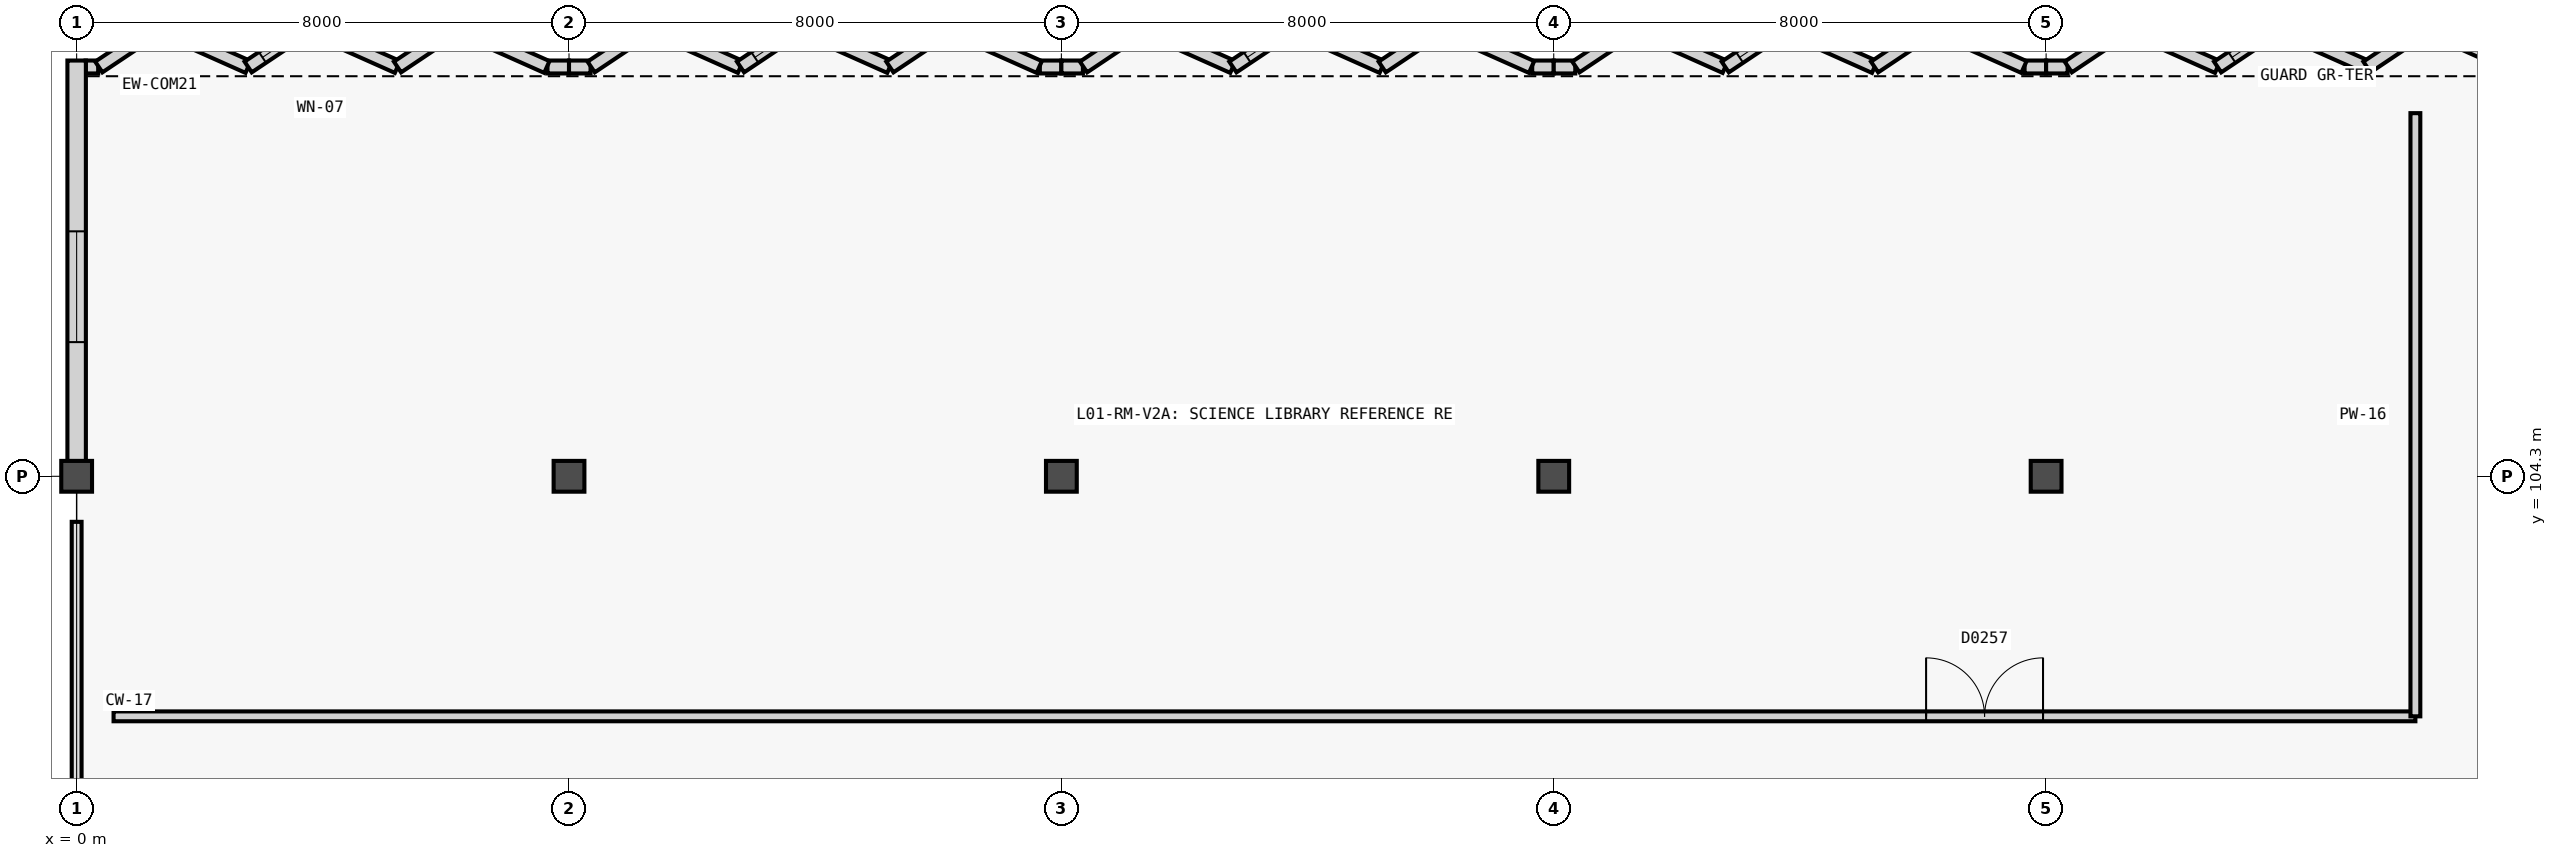
"""IFC4 building model, lengths in metres.
Left out: names, types, materials, properties, quantities, classifications, styles, units other than length and angle.
Written with IfcOpenShell. Run it as: python <this file> out.ifc"""

import sys

from ifc_helpers import new_model, si_unit, direction, frame, frame_2d, origin, origin_2d, place, context, subcontext, project, spatial, rectangle, extrude, element, fill, save


model = new_model("IFC4")
c1 = context("Model", 3, precision=1e-05, world=origin(), true_north=direction((0.0, 1.0)))
c2 = subcontext(c1, "Body", "Model", "MODEL_VIEW")
j1 = project(units=[si_unit("LENGTHUNIT", "METRE"), si_unit("PLANEANGLEUNIT", "RADIAN")], contexts=[c1])
p1 = place(None, origin())
s1 = spatial("IfcSite", under=j1, at=p1, CompositionType="ELEMENT")
p2 = place(p1, origin())
s2 = spatial("IfcBuilding", under=s1, at=p2, CompositionType="ELEMENT")
p3 = place(p2, frame((0.0, 0.0, 5.4)))
s3 = spatial("IfcBuildingStorey", under=s2, at=p3, CompositionType="ELEMENT", Elevation=5.4)
for number, where, z_axis, x_axis in (
    (1, (0.0, 104.3, 0.0), (0.0, 0.0, 1.0), (1.0, 0.0, 0.0)),
    (2, (8.0, 104.3, 0.0), (0.0, 0.0, 1.0), (1.0, 0.0, 0.0)),
    (3, (16.0, 104.3, 0.0), (0.0, 0.0, 1.0), (1.0, 0.0, 0.0)),
    (4, (24.0, 104.3, 0.0), (0.0, 0.0, 1.0), (1.0, 0.0, 0.0)),
    (5, (32.0, 104.3, 0.0), (0.0, 0.0, 1.0), (1.0, 0.0, 0.0)),
):
    element("IfcColumn", number, at=place(p3, frame(where, z_axis=z_axis, x_axis=x_axis)), inside=s3, PredefinedType="COLUMN", context=c2, shape_type="SweptSolid", body=[
        extrude(rectangle(XDim=0.5, YDim=0.5, at=origin_2d()), origin(), (0.0, 0.0, 1.0), 4.8),
    ])
p4 = place(p3, frame((0.145, 110.95, 0.0), z_axis=(0.0, 0.0, 1.0), x_axis=(1.0, 0.0, 0.0)))
e6 = element("IfcWall", 6, at=p4, inside=s3, PredefinedType="SOLIDWALL", context=c2, shape_type="SweptSolid", body=[
    extrude(rectangle(XDim=0.205, YDim=0.21, at=frame_2d((0.103, 0.0))), origin(), (0.0, 0.0, 1.0), 4.52),
])
for number, where, z_axis, x_axis in (
    (7, (7.65, 110.95, 0.0), (0.0, 0.0, 1.0), (1.0, 0.0, 0.0)),
    (8, (8.0, 110.95, 0.0), (0.0, 0.0, 1.0), (1.0, 0.0, 0.0)),
    (9, (15.65, 110.95, 0.0), (0.0, 0.0, 1.0), (1.0, 0.0, 0.0)),
    (10, (16.0, 110.95, 0.0), (0.0, 0.0, 1.0), (1.0, 0.0, 0.0)),
    (11, (23.65, 110.95, 0.0), (0.0, 0.0, 1.0), (1.0, 0.0, 0.0)),
    (12, (24.0, 110.95, 0.0), (0.0, 0.0, 1.0), (1.0, 0.0, 0.0)),
    (13, (31.65, 110.95, 0.0), (0.0, 0.0, 1.0), (1.0, 0.0, 0.0)),
    (14, (32.0, 110.95, 0.0), (0.0, 0.0, 1.0), (1.0, 0.0, 0.0)),
):
    element("IfcWall", number, at=place(p3, frame(where, z_axis=z_axis, x_axis=x_axis)), inside=s3, PredefinedType="SOLIDWALL", context=c2, shape_type="SweptSolid", body=[
        extrude(rectangle(XDim=0.35, YDim=0.21, at=frame_2d((0.175, 0.0))), origin(), (0.0, 0.0, 1.0), 4.52),
    ])
p5 = place(p3, frame((0.36, 110.95, 0.0), z_axis=(0.0, 0.0, 1.0), x_axis=(0.830858868059, 0.556483190553, 0.0)))
e15 = element("IfcWall", 15, at=p5, inside=s3, PredefinedType="SOLIDWALL", context=c2, shape_type="SweptSolid", body=[
    extrude(rectangle(XDim=1.168, YDim=0.21, at=frame_2d((0.584, 0.0))), origin(), (0.0, 0.0, 1.0), 4.52),
])
p6 = place(p3, frame((1.331, 111.6, 0.0), z_axis=(0.0, 0.0, 1.0), x_axis=(0.913083928543, -0.407771675618, 0.0)))
e16 = element("IfcWall", 16, at=p6, inside=s3, PredefinedType="SOLIDWALL", context=c2, shape_type="SweptSolid", body=[
    extrude(rectangle(XDim=1.594, YDim=0.21, at=frame_2d((0.797, 0.0))), origin(), (0.0, 0.0, 1.0), 4.52),
])
p7 = place(p3, frame((2.787, 110.95, 0.0), z_axis=(0.0, 0.0, 1.0), x_axis=(0.830858868059, 0.556483190553, 0.0)))
e17 = element("IfcWall", 17, at=p7, inside=s3, PredefinedType="SOLIDWALL", context=c2, shape_type="SweptSolid", body=[
    extrude(rectangle(XDim=1.168, YDim=0.21, at=frame_2d((0.584, 0.0))), origin(), (0.0, 0.0, 1.0), 4.52),
])
p8 = place(p7, frame((0.28, 0.0, 0.85)))
e18 = element("IfcOpeningElement", 18, at=p8, cuts=e17, PredefinedType="OPENING", context=c2, shape_type="SweptSolid", body=[
    extrude(rectangle(XDim=0.65, YDim=1.7, at=frame_2d((0.325, 0.85))), frame((0.0, 0.115, 0.0), z_axis=(0.0, -1.0, 0.0), x_axis=(1.0, 0.0, 0.0)), (0.0, 0.0, 1.0), 0.23),
])
p9 = place(p3, frame((3.757, 111.6, 0.0), z_axis=(0.0, 0.0, 1.0), x_axis=(0.913109384471, -0.407714669826, 0.0)))
e19 = element("IfcWall", 19, at=p9, inside=s3, PredefinedType="SOLIDWALL", context=c2, shape_type="SweptSolid", body=[
    extrude(rectangle(XDim=1.595, YDim=0.21, at=frame_2d((0.797, 0.0))), origin(), (0.0, 0.0, 1.0), 4.52),
])
p10 = place(p3, frame((5.213, 110.95, 0.0), z_axis=(0.0, 0.0, 1.0), x_axis=(0.830858868059, 0.556483190553, 0.0)))
e20 = element("IfcWall", 20, at=p10, inside=s3, PredefinedType="SOLIDWALL", context=c2, shape_type="SweptSolid", body=[
    extrude(rectangle(XDim=1.168, YDim=0.21, at=frame_2d((0.584, 0.0))), origin(), (0.0, 0.0, 1.0), 4.52),
])
p11 = place(p3, frame((6.184, 111.6, 0.0), z_axis=(0.0, 0.0, 1.0), x_axis=(0.913083928543, -0.407771675618, 0.0)))
e21 = element("IfcWall", 21, at=p11, inside=s3, PredefinedType="SOLIDWALL", context=c2, shape_type="SweptSolid", body=[
    extrude(rectangle(XDim=1.594, YDim=0.21, at=frame_2d((0.797, 0.0))), origin(), (0.0, 0.0, 1.0), 4.52),
])
p12 = place(p3, frame((8.36, 110.95, 0.0), z_axis=(0.0, 0.0, 1.0), x_axis=(0.830858868059, 0.556483190553, 0.0)))
e22 = element("IfcWall", 22, at=p12, inside=s3, PredefinedType="SOLIDWALL", context=c2, shape_type="SweptSolid", body=[
    extrude(rectangle(XDim=1.168, YDim=0.21, at=frame_2d((0.584, 0.0))), origin(), (0.0, 0.0, 1.0), 4.52),
])
p13 = place(p3, frame((9.331, 111.6, 0.0), z_axis=(0.0, 0.0, 1.0), x_axis=(0.913083928543, -0.407771675618, 0.0)))
e23 = element("IfcWall", 23, at=p13, inside=s3, PredefinedType="SOLIDWALL", context=c2, shape_type="SweptSolid", body=[
    extrude(rectangle(XDim=1.594, YDim=0.21, at=frame_2d((0.797, 0.0))), origin(), (0.0, 0.0, 1.0), 4.52),
])
p14 = place(p3, frame((10.787, 110.95, 0.0), z_axis=(0.0, 0.0, 1.0), x_axis=(0.830858868059, 0.556483190553, 0.0)))
e24 = element("IfcWall", 24, at=p14, inside=s3, PredefinedType="SOLIDWALL", context=c2, shape_type="SweptSolid", body=[
    extrude(rectangle(XDim=1.168, YDim=0.21, at=frame_2d((0.584, 0.0))), origin(), (0.0, 0.0, 1.0), 4.52),
])
p15 = place(p14, frame((0.28, 0.0, 0.85)))
e25 = element("IfcOpeningElement", 25, at=p15, cuts=e24, PredefinedType="OPENING", context=c2, shape_type="SweptSolid", body=[
    extrude(rectangle(XDim=0.65, YDim=1.7, at=frame_2d((0.325, 0.85))), frame((0.0, 0.115, 0.0), z_axis=(0.0, -1.0, 0.0), x_axis=(1.0, 0.0, 0.0)), (0.0, 0.0, 1.0), 0.23),
])
p16 = place(p3, frame((11.757, 111.6, 0.0), z_axis=(0.0, 0.0, 1.0), x_axis=(0.913109384471, -0.407714669826, 0.0)))
e26 = element("IfcWall", 26, at=p16, inside=s3, PredefinedType="SOLIDWALL", context=c2, shape_type="SweptSolid", body=[
    extrude(rectangle(XDim=1.595, YDim=0.21, at=frame_2d((0.797, 0.0))), origin(), (0.0, 0.0, 1.0), 4.52),
])
p17 = place(p3, frame((13.213, 110.95, 0.0), z_axis=(0.0, 0.0, 1.0), x_axis=(0.830858868059, 0.556483190553, 0.0)))
e27 = element("IfcWall", 27, at=p17, inside=s3, PredefinedType="SOLIDWALL", context=c2, shape_type="SweptSolid", body=[
    extrude(rectangle(XDim=1.168, YDim=0.21, at=frame_2d((0.584, 0.0))), origin(), (0.0, 0.0, 1.0), 4.52),
])
p18 = place(p3, frame((14.184, 111.6, 0.0), z_axis=(0.0, 0.0, 1.0), x_axis=(0.913083928543, -0.407771675618, 0.0)))
e28 = element("IfcWall", 28, at=p18, inside=s3, PredefinedType="SOLIDWALL", context=c2, shape_type="SweptSolid", body=[
    extrude(rectangle(XDim=1.594, YDim=0.21, at=frame_2d((0.797, 0.0))), origin(), (0.0, 0.0, 1.0), 4.52),
])
p19 = place(p3, frame((16.36, 110.95, 0.0), z_axis=(0.0, 0.0, 1.0), x_axis=(0.830858868059, 0.556483190553, 0.0)))
e29 = element("IfcWall", 29, at=p19, inside=s3, PredefinedType="SOLIDWALL", context=c2, shape_type="SweptSolid", body=[
    extrude(rectangle(XDim=1.168, YDim=0.21, at=frame_2d((0.584, 0.0))), origin(), (0.0, 0.0, 1.0), 4.52),
])
p20 = place(p3, frame((17.331, 111.6, 0.0), z_axis=(0.0, 0.0, 1.0), x_axis=(0.913083928543, -0.407771675618, 0.0)))
e30 = element("IfcWall", 30, at=p20, inside=s3, PredefinedType="SOLIDWALL", context=c2, shape_type="SweptSolid", body=[
    extrude(rectangle(XDim=1.594, YDim=0.21, at=frame_2d((0.797, 0.0))), origin(), (0.0, 0.0, 1.0), 4.52),
])
p21 = place(p3, frame((18.787, 110.95, 0.0), z_axis=(0.0, 0.0, 1.0), x_axis=(0.830858868059, 0.556483190553, 0.0)))
e31 = element("IfcWall", 31, at=p21, inside=s3, PredefinedType="SOLIDWALL", context=c2, shape_type="SweptSolid", body=[
    extrude(rectangle(XDim=1.168, YDim=0.21, at=frame_2d((0.584, 0.0))), origin(), (0.0, 0.0, 1.0), 4.52),
])
p22 = place(p21, frame((0.28, 0.0, 0.85)))
e32 = element("IfcOpeningElement", 32, at=p22, cuts=e31, PredefinedType="OPENING", context=c2, shape_type="SweptSolid", body=[
    extrude(rectangle(XDim=0.65, YDim=1.7, at=frame_2d((0.325, 0.85))), frame((0.0, 0.115, 0.0), z_axis=(0.0, -1.0, 0.0), x_axis=(1.0, 0.0, 0.0)), (0.0, 0.0, 1.0), 0.23),
])
p23 = place(p3, frame((19.757, 111.6, 0.0), z_axis=(0.0, 0.0, 1.0), x_axis=(0.913109384471, -0.407714669826, 0.0)))
e33 = element("IfcWall", 33, at=p23, inside=s3, PredefinedType="SOLIDWALL", context=c2, shape_type="SweptSolid", body=[
    extrude(rectangle(XDim=1.595, YDim=0.21, at=frame_2d((0.797, 0.0))), origin(), (0.0, 0.0, 1.0), 4.52),
])
p24 = place(p3, frame((21.213, 110.95, 0.0), z_axis=(0.0, 0.0, 1.0), x_axis=(0.830858868059, 0.556483190553, 0.0)))
e34 = element("IfcWall", 34, at=p24, inside=s3, PredefinedType="SOLIDWALL", context=c2, shape_type="SweptSolid", body=[
    extrude(rectangle(XDim=1.168, YDim=0.21, at=frame_2d((0.584, 0.0))), origin(), (0.0, 0.0, 1.0), 4.52),
])
p25 = place(p3, frame((22.184, 111.6, 0.0), z_axis=(0.0, 0.0, 1.0), x_axis=(0.913083928543, -0.407771675618, 0.0)))
e35 = element("IfcWall", 35, at=p25, inside=s3, PredefinedType="SOLIDWALL", context=c2, shape_type="SweptSolid", body=[
    extrude(rectangle(XDim=1.594, YDim=0.21, at=frame_2d((0.797, 0.0))), origin(), (0.0, 0.0, 1.0), 4.52),
])
p26 = place(p3, frame((24.36, 110.95, 0.0), z_axis=(0.0, 0.0, 1.0), x_axis=(0.830858868059, 0.556483190553, 0.0)))
e36 = element("IfcWall", 36, at=p26, inside=s3, PredefinedType="SOLIDWALL", context=c2, shape_type="SweptSolid", body=[
    extrude(rectangle(XDim=1.168, YDim=0.21, at=frame_2d((0.584, 0.0))), origin(), (0.0, 0.0, 1.0), 4.52),
])
p27 = place(p3, frame((25.331, 111.6, 0.0), z_axis=(0.0, 0.0, 1.0), x_axis=(0.913083928543, -0.407771675618, 0.0)))
e37 = element("IfcWall", 37, at=p27, inside=s3, PredefinedType="SOLIDWALL", context=c2, shape_type="SweptSolid", body=[
    extrude(rectangle(XDim=1.594, YDim=0.21, at=frame_2d((0.797, 0.0))), origin(), (0.0, 0.0, 1.0), 4.52),
])
p28 = place(p3, frame((26.787, 110.95, 0.0), z_axis=(0.0, 0.0, 1.0), x_axis=(0.830858868059, 0.556483190553, 0.0)))
e38 = element("IfcWall", 38, at=p28, inside=s3, PredefinedType="SOLIDWALL", context=c2, shape_type="SweptSolid", body=[
    extrude(rectangle(XDim=1.168, YDim=0.21, at=frame_2d((0.584, 0.0))), origin(), (0.0, 0.0, 1.0), 4.52),
])
p29 = place(p28, frame((0.28, 0.0, 0.85)))
e39 = element("IfcOpeningElement", 39, at=p29, cuts=e38, PredefinedType="OPENING", context=c2, shape_type="SweptSolid", body=[
    extrude(rectangle(XDim=0.65, YDim=1.7, at=frame_2d((0.325, 0.85))), frame((0.0, 0.115, 0.0), z_axis=(0.0, -1.0, 0.0), x_axis=(1.0, 0.0, 0.0)), (0.0, 0.0, 1.0), 0.23),
])
p30 = place(p3, frame((27.757, 111.6, 0.0), z_axis=(0.0, 0.0, 1.0), x_axis=(0.913109384471, -0.407714669826, 0.0)))
e40 = element("IfcWall", 40, at=p30, inside=s3, PredefinedType="SOLIDWALL", context=c2, shape_type="SweptSolid", body=[
    extrude(rectangle(XDim=1.595, YDim=0.21, at=frame_2d((0.797, 0.0))), origin(), (0.0, 0.0, 1.0), 4.52),
])
p31 = place(p3, frame((29.213, 110.95, 0.0), z_axis=(0.0, 0.0, 1.0), x_axis=(0.830858868059, 0.556483190553, 0.0)))
e41 = element("IfcWall", 41, at=p31, inside=s3, PredefinedType="SOLIDWALL", context=c2, shape_type="SweptSolid", body=[
    extrude(rectangle(XDim=1.168, YDim=0.21, at=frame_2d((0.584, 0.0))), origin(), (0.0, 0.0, 1.0), 4.52),
])
p32 = place(p3, frame((30.184, 111.6, 0.0), z_axis=(0.0, 0.0, 1.0), x_axis=(0.913083928543, -0.407771675618, 0.0)))
e42 = element("IfcWall", 42, at=p32, inside=s3, PredefinedType="SOLIDWALL", context=c2, shape_type="SweptSolid", body=[
    extrude(rectangle(XDim=1.594, YDim=0.21, at=frame_2d((0.797, 0.0))), origin(), (0.0, 0.0, 1.0), 4.52),
])
p33 = place(p3, frame((32.36, 110.95, 0.0), z_axis=(0.0, 0.0, 1.0), x_axis=(0.830858868059, 0.556483190553, 0.0)))
e43 = element("IfcWall", 43, at=p33, inside=s3, PredefinedType="SOLIDWALL", context=c2, shape_type="SweptSolid", body=[
    extrude(rectangle(XDim=1.168, YDim=0.21, at=frame_2d((0.584, 0.0))), origin(), (0.0, 0.0, 1.0), 4.52),
])
p34 = place(p3, frame((33.331, 111.6, 0.0), z_axis=(0.0, 0.0, 1.0), x_axis=(0.913083928543, -0.407771675618, 0.0)))
e44 = element("IfcWall", 44, at=p34, inside=s3, PredefinedType="SOLIDWALL", context=c2, shape_type="SweptSolid", body=[
    extrude(rectangle(XDim=1.594, YDim=0.21, at=frame_2d((0.797, 0.0))), origin(), (0.0, 0.0, 1.0), 4.52),
])
p35 = place(p3, frame((34.787, 110.95, 0.0), z_axis=(0.0, 0.0, 1.0), x_axis=(0.830858868059, 0.556483190553, 0.0)))
e45 = element("IfcWall", 45, at=p35, inside=s3, PredefinedType="SOLIDWALL", context=c2, shape_type="SweptSolid", body=[
    extrude(rectangle(XDim=1.168, YDim=0.21, at=frame_2d((0.584, 0.0))), origin(), (0.0, 0.0, 1.0), 4.52),
])
p36 = place(p35, frame((0.28, 0.0, 0.85)))
e46 = element("IfcOpeningElement", 46, at=p36, cuts=e45, PredefinedType="OPENING", context=c2, shape_type="SweptSolid", body=[
    extrude(rectangle(XDim=0.65, YDim=1.7, at=frame_2d((0.325, 0.85))), frame((0.0, 0.115, 0.0), z_axis=(0.0, -1.0, 0.0), x_axis=(1.0, 0.0, 0.0)), (0.0, 0.0, 1.0), 0.23),
])
p37 = place(p3, frame((35.757, 111.6, 0.0), z_axis=(0.0, 0.0, 1.0), x_axis=(0.913109384471, -0.407714669826, 0.0)))
e47 = element("IfcWall", 47, at=p37, inside=s3, PredefinedType="SOLIDWALL", context=c2, shape_type="SweptSolid", body=[
    extrude(rectangle(XDim=1.595, YDim=0.21, at=frame_2d((0.797, 0.0))), origin(), (0.0, 0.0, 1.0), 4.52),
])
p38 = place(p3, frame((37.213, 110.95, 0.0), z_axis=(0.0, 0.0, 1.0), x_axis=(0.830858868059, 0.556483190553, 0.0)))
e48 = element("IfcWall", 48, at=p38, inside=s3, PredefinedType="SOLIDWALL", context=c2, shape_type="SweptSolid", body=[
    extrude(rectangle(XDim=1.168, YDim=0.21, at=frame_2d((0.584, 0.0))), origin(), (0.0, 0.0, 1.0), 4.52),
])
p39 = place(p3, frame((38.184, 111.6, 0.0), z_axis=(0.0, 0.0, 1.0), x_axis=(0.913083928543, -0.407771675618, 0.0)))
e49 = element("IfcWall", 49, at=p39, inside=s3, PredefinedType="SOLIDWALL", context=c2, shape_type="SweptSolid", body=[
    extrude(rectangle(XDim=1.594, YDim=0.21, at=frame_2d((0.797, 0.0))), origin(), (0.0, 0.0, 1.0), 4.52),
])
p40 = place(p3, frame((0.0, 104.548, 0.0), z_axis=(0.0, 0.0, 1.0), x_axis=(0.0, 1.0, 0.0)))
e50 = element("IfcWall", 50, at=p40, inside=s3, PredefinedType="SOLIDWALL", context=c2, shape_type="SweptSolid", body=[
    extrude(rectangle(XDim=6.507, YDim=0.3, at=frame_2d((3.253, 0.0))), origin(), (0.0, 0.0, 1.0), 4.52),
])
p41 = place(p40, frame((1.932, 0.0, 0.9)))
e51 = element("IfcOpeningElement", 51, at=p41, cuts=e50, PredefinedType="OPENING", context=c2, shape_type="SweptSolid", body=[
    extrude(rectangle(XDim=1.8, YDim=1.55, at=frame_2d((0.9, 0.775))), frame((0.0, 0.16, 0.0), z_axis=(0.0, -1.0, 0.0), x_axis=(1.0, 0.0, 0.0)), (0.0, 0.0, 1.0), 0.32),
])
p42 = place(p3, frame((0.6, 100.4, 0.0), z_axis=(0.0, 0.0, 1.0), x_axis=(1.0, 0.0, 0.0)))
e52 = element("IfcWall", 52, at=p42, inside=s3, PredefinedType="PARTITIONING", context=c2, shape_type="SweptSolid", body=[
    extrude(rectangle(XDim=37.4, YDim=0.16, at=frame_2d((18.7, 0.0))), origin(), (0.0, 0.0, 1.0), 4.54),
])
p43 = place(p42, frame((29.45, 0.0, 0.0)))
e53 = element("IfcOpeningElement", 53, at=p43, cuts=e52, PredefinedType="OPENING", context=c2, shape_type="SweptSolid", body=[
    extrude(rectangle(XDim=1.9, YDim=2.3, at=frame_2d((0.95, 1.15))), frame((0.0, 0.09, 0.0), z_axis=(0.0, -1.0, 0.0), x_axis=(1.0, 0.0, 0.0)), (0.0, 0.0, 1.0), 0.18),
])
p44 = place(p3, frame((38.0, 100.4, 0.0), z_axis=(0.0, 0.0, 1.0), x_axis=(0.0, 1.0, 0.0)))
e54 = element("IfcWall", 54, at=p44, inside=s3, PredefinedType="PARTITIONING", context=c2, shape_type="SweptSolid", body=[
    extrude(rectangle(XDim=9.8, YDim=0.16, at=frame_2d((4.9, 0.0))), origin(), (0.0, 0.0, 1.0), 4.54),
])
p45 = place(p8, origin())
e55 = element("IfcWindow", 55, at=p45, inside=s3, PartitioningType="SINGLE_PANEL", PredefinedType="WINDOW", context=c2, shape_type="SweptSolid", body=[
    extrude(rectangle(XDim=0.65, YDim=1.7, at=frame_2d((0.325, 0.85))), frame((0.0, 0.03, 0.0), z_axis=(0.0, -1.0, 0.0), x_axis=(1.0, 0.0, 0.0)), (0.0, 0.0, 1.0), 0.06),
])
fill(e18, e55)
p46 = place(p15, origin())
e56 = element("IfcWindow", 56, at=p46, inside=s3, PartitioningType="SINGLE_PANEL", PredefinedType="WINDOW", context=c2, shape_type="SweptSolid", body=[
    extrude(rectangle(XDim=0.65, YDim=1.7, at=frame_2d((0.325, 0.85))), frame((0.0, 0.03, 0.0), z_axis=(0.0, -1.0, 0.0), x_axis=(1.0, 0.0, 0.0)), (0.0, 0.0, 1.0), 0.06),
])
fill(e25, e56)
p47 = place(p22, origin())
e57 = element("IfcWindow", 57, at=p47, inside=s3, PartitioningType="SINGLE_PANEL", PredefinedType="WINDOW", context=c2, shape_type="SweptSolid", body=[
    extrude(rectangle(XDim=0.65, YDim=1.7, at=frame_2d((0.325, 0.85))), frame((0.0, 0.03, 0.0), z_axis=(0.0, -1.0, 0.0), x_axis=(1.0, 0.0, 0.0)), (0.0, 0.0, 1.0), 0.06),
])
fill(e32, e57)
p48 = place(p29, origin())
e58 = element("IfcWindow", 58, at=p48, inside=s3, PartitioningType="SINGLE_PANEL", PredefinedType="WINDOW", context=c2, shape_type="SweptSolid", body=[
    extrude(rectangle(XDim=0.65, YDim=1.7, at=frame_2d((0.325, 0.85))), frame((0.0, 0.03, 0.0), z_axis=(0.0, -1.0, 0.0), x_axis=(1.0, 0.0, 0.0)), (0.0, 0.0, 1.0), 0.06),
])
fill(e39, e58)
p49 = place(p36, origin())
e59 = element("IfcWindow", 59, at=p49, inside=s3, PartitioningType="SINGLE_PANEL", PredefinedType="WINDOW", context=c2, shape_type="SweptSolid", body=[
    extrude(rectangle(XDim=0.65, YDim=1.7, at=frame_2d((0.325, 0.85))), frame((0.0, 0.03, 0.0), z_axis=(0.0, -1.0, 0.0), x_axis=(1.0, 0.0, 0.0)), (0.0, 0.0, 1.0), 0.06),
])
fill(e46, e59)
p50 = place(p41, origin())
e60 = element("IfcWindow", 60, at=p50, inside=s3, PartitioningType="SINGLE_PANEL", PredefinedType="WINDOW", context=c2, shape_type="SweptSolid", body=[
    extrude(rectangle(XDim=1.8, YDim=1.55, at=frame_2d((0.9, 0.775))), frame((0.0, 0.03, 0.0), z_axis=(0.0, -1.0, 0.0), x_axis=(1.0, 0.0, 0.0)), (0.0, 0.0, 1.0), 0.06),
])
fill(e51, e60)
p51 = place(p43, origin())
e61 = element("IfcDoor", 61, at=p51, inside=s3, OperationType="DOUBLE_DOOR_SINGLE_SWING", PredefinedType="DOOR", context=c2, shape_type="SweptSolid", body=[
    extrude(rectangle(XDim=1.9, YDim=2.3, at=frame_2d((0.95, 1.15))), frame((0.0, 0.025, 0.0), z_axis=(0.0, -1.0, 0.0), x_axis=(1.0, 0.0, 0.0)), (0.0, 0.0, 1.0), 0.05),
])
fill(e53, e61)
save(model, sys.argv[1])
